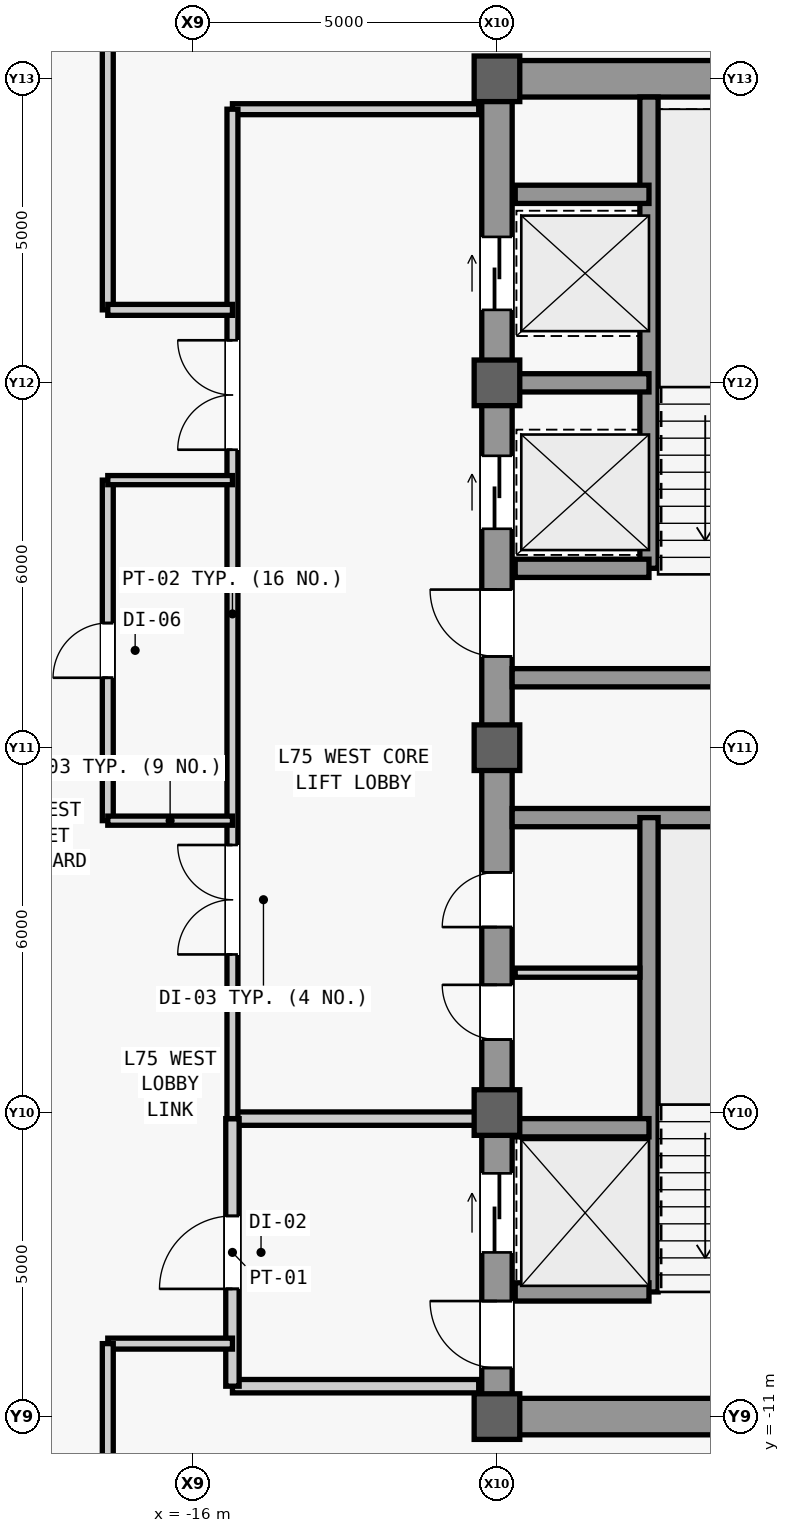
"""IFC4 building model, lengths in metres.
Left out: names, types, materials, properties, quantities, classifications, styles, units other than length and angle.
Written with IfcOpenShell. Run it as: python <this file> out.ifc"""

import sys

from ifc_helpers import new_model, si_unit, direction, frame, frame_2d, origin, origin_2d, place, context, subcontext, project, spatial, rectangle, extrude, source, transform, mapped, element, fill, save


model = new_model("IFC4")
c1 = context("Model", 3, precision=1e-05, world=origin(), true_north=direction((0.0, 1.0)))
c2 = subcontext(c1, "Body", "Model", "MODEL_VIEW")
j1 = project(units=[si_unit("LENGTHUNIT", "METRE"), si_unit("PLANEANGLEUNIT", "RADIAN")], contexts=[c1])
p1 = place(None, origin())
s1 = spatial("IfcSite", under=j1, at=p1, CompositionType="ELEMENT")
p2 = place(p1, origin())
s2 = spatial("IfcBuilding", under=s1, at=p2, CompositionType="ELEMENT")
p3 = place(p2, frame((0.0, 0.0, 317.5)))
s3 = spatial("IfcBuildingStorey", under=s2, at=p3, CompositionType="ELEMENT", Elevation=317.5)
m1 = source(origin(), c2, "Body", "SweptSolid", [
    extrude(rectangle(XDim=22.0, YDim=0.5, at=frame_2d((11.0, 0.0))), origin(), (0.0, 0.0, 1.0), 3.78),
])
p4 = place(p3, frame((-11.0, -11.0, 0.0), z_axis=(0.0, 0.0, 1.0), x_axis=(0.0, 1.0, 0.0)))
e1 = element("IfcWall", 1, at=p4, inside=s3, PredefinedType="SHEAR", context=c2, shape_type="MappedRepresentation", body=[
    mapped(m1, transform((0.0, 0.0, 0.0), scale=1.0)),
])
m2 = source(origin(), c2, "Body", "SweptSolid", [
    extrude(rectangle(XDim=1.1, YDim=2.2, at=frame_2d((0.55, 1.1))), frame((0.0, 0.26, 0.0), z_axis=(0.0, -1.0, 0.0), x_axis=(1.0, 0.0, 0.0)), (0.0, 0.0, 1.0), 0.52),
])
p5 = place(p4, frame((0.8, 0.0, 0.0)))
e2 = element("IfcOpeningElement", 2, at=p5, cuts=e1, PredefinedType="OPENING", context=c2, shape_type="MappedRepresentation", body=[
    mapped(m2, transform((0.0, 0.0, 0.0), scale=1.0)),
])
p6 = place(p4, frame((12.5, 0.0, 0.0)))
e3 = element("IfcOpeningElement", 3, at=p6, cuts=e1, PredefinedType="OPENING", context=c2, shape_type="MappedRepresentation", body=[
    mapped(m2, transform((0.0, 0.0, 0.0), scale=1.0)),
])
m3 = source(origin(), c2, "Body", "SweptSolid", [
    extrude(rectangle(XDim=0.9, YDim=2.15, at=frame_2d((0.45, 1.075))), frame((0.0, 0.26, 0.0), z_axis=(0.0, -1.0, 0.0), x_axis=(1.0, 0.0, 0.0)), (0.0, 0.0, 1.0), 0.52),
])
p7 = place(p4, frame((6.2, 0.0, 0.0)))
e4 = element("IfcOpeningElement", 4, at=p7, cuts=e1, PredefinedType="OPENING", context=c2, shape_type="MappedRepresentation", body=[
    mapped(m3, transform((0.0, 0.0, 0.0), scale=1.0)),
])
p8 = place(p4, frame((8.05, 0.0, 0.0)))
e5 = element("IfcOpeningElement", 5, at=p8, cuts=e1, PredefinedType="OPENING", context=c2, shape_type="MappedRepresentation", body=[
    mapped(m3, transform((0.0, 0.0, 0.0), scale=1.0)),
])
m4 = source(origin(), c2, "Body", "SweptSolid", [
    extrude(rectangle(XDim=1.2, YDim=2.3, at=frame_2d((0.6, 1.15))), frame((0.0, 0.26, 0.0), z_axis=(0.0, -1.0, 0.0), x_axis=(1.0, 0.0, 0.0)), (0.0, 0.0, 1.0), 0.52),
])
p9 = place(p4, frame((14.6, 0.0, 0.0)))
e6 = element("IfcOpeningElement", 6, at=p9, cuts=e1, PredefinedType="OPENING", context=c2, shape_type="MappedRepresentation", body=[
    mapped(m4, transform((0.0, 0.0, 0.0), scale=1.0)),
])
p10 = place(p4, frame((18.2, 0.0, 0.0)))
e7 = element("IfcOpeningElement", 7, at=p10, cuts=e1, PredefinedType="OPENING", context=c2, shape_type="MappedRepresentation", body=[
    mapped(m4, transform((0.0, 0.0, 0.0), scale=1.0)),
])
m5 = source(origin(), c2, "Body", "SweptSolid", [
    extrude(rectangle(XDim=1.3, YDim=2.3, at=frame_2d((0.65, 1.15))), frame((0.0, 0.26, 0.0), z_axis=(0.0, -1.0, 0.0), x_axis=(1.0, 0.0, 0.0)), (0.0, 0.0, 1.0), 0.52),
])
p11 = place(p4, frame((2.7, 0.0, 0.0)))
e8 = element("IfcOpeningElement", 8, at=p11, cuts=e1, PredefinedType="OPENING", context=c2, shape_type="MappedRepresentation", body=[
    mapped(m5, transform((0.0, 0.0, 0.0), scale=1.0)),
])
m6 = source(origin(), c2, "Body", "SweptSolid", [
    extrude(rectangle(XDim=5.9, YDim=0.6, at=frame_2d((2.95, 0.0))), origin(), (0.0, 0.0, 1.0), 3.78),
])
for number, where, z_axis, x_axis in (
    (9, (-10.75, -11.0, 0.0), (0.0, 0.0, 1.0), (1.0, 0.0, 0.0)),
    (10, (-10.75, 11.0, 0.0), (0.0, 0.0, 1.0), (1.0, 0.0, 0.0)),
):
    element("IfcWall", number, at=place(p3, frame(where, z_axis=z_axis, x_axis=x_axis)), inside=s3, PredefinedType="SHEAR", context=c2, shape_type="MappedRepresentation", body=[
        mapped(m6, transform((0.0, 0.0, 0.0), scale=1.0)),
    ])
m7 = source(origin(), c2, "Body", "SweptSolid", [
    extrude(rectangle(XDim=5.65, YDim=0.3, at=frame_2d((2.825, 0.0))), origin(), (0.0, 0.0, 1.0), 3.78),
])
for number, where, z_axis, x_axis in (
    (11, (-10.75, -1.15, 0.0), (0.0, 0.0, 1.0), (1.0, 0.0, 0.0)),
    (12, (-10.75, 1.15, 0.0), (0.0, 0.0, 1.0), (1.0, 0.0, 0.0)),
):
    element("IfcWall", number, at=place(p3, frame(where, z_axis=z_axis, x_axis=x_axis)), inside=s3, PredefinedType="SHEAR", context=c2, shape_type="MappedRepresentation", body=[
        mapped(m7, transform((0.0, 0.0, 0.0), scale=1.0)),
    ])
m8 = source(origin(), c2, "Body", "SweptSolid", [
    extrude(rectangle(XDim=0.75, YDim=0.75, at=origin_2d()), origin(), (0.0, 0.0, 1.0), 4.0),
])
for number, where, z_axis, x_axis in (
    (13, (-11.0, -11.0, 0.0), (0.0, 0.0, 1.0), (1.0, 0.0, 0.0)),
    (14, (-11.0, -6.0, 0.0), (0.0, 0.0, 1.0), (1.0, 0.0, 0.0)),
    (15, (-11.0, 0.0, 0.0), (0.0, 0.0, 1.0), (1.0, 0.0, 0.0)),
    (16, (-11.0, 6.0, 0.0), (0.0, 0.0, 1.0), (1.0, 0.0, 0.0)),
    (17, (-11.0, 11.0, 0.0), (0.0, 0.0, 1.0), (1.0, 0.0, 0.0)),
):
    element("IfcColumn", number, at=place(p3, frame(where, z_axis=z_axis, x_axis=x_axis)), inside=s3, PredefinedType="COLUMN", context=c2, shape_type="MappedRepresentation", body=[
        mapped(m8, transform((0.0, 0.0, 0.0), scale=1.0)),
    ])
m9 = source(origin(), c2, "Body", "SweptSolid", [
    extrude(rectangle(XDim=7.8, YDim=0.3, at=frame_2d((3.9, 0.0))), origin(), (0.0, 0.0, 1.0), 3.78),
])
p12 = place(p3, frame((-8.5, -8.95, 0.0), z_axis=(0.0, 0.0, 1.0), x_axis=(0.0, 1.0, 0.0)))
e18 = element("IfcWall", 18, at=p12, inside=s3, PredefinedType="SHEAR", context=c2, shape_type="MappedRepresentation", body=[
    mapped(m9, transform((0.0, 0.0, 0.0), scale=1.0)),
])
m10 = source(origin(), c2, "Body", "SweptSolid", [
    extrude(rectangle(XDim=2.2, YDim=0.3, at=frame_2d((1.1, 0.0))), origin(), (0.0, 0.0, 1.0), 3.78),
])
for number, where, z_axis, x_axis in (
    (19, (-10.7, -8.95, 0.0), (0.0, 0.0, 1.0), (1.0, 0.0, 0.0)),
    (20, (-10.7, -6.25, 0.0), (0.0, 0.0, 1.0), (1.0, 0.0, 0.0)),
):
    element("IfcWall", number, at=place(p3, frame(where, z_axis=z_axis, x_axis=x_axis)), inside=s3, PredefinedType="SHEAR", context=c2, shape_type="MappedRepresentation", body=[
        mapped(m10, transform((0.0, 0.0, 0.0), scale=1.0)),
    ])
m11 = source(origin(), c2, "Body", "SweptSolid", [
    extrude(rectangle(XDim=7.75, YDim=0.3, at=frame_2d((3.875, 0.0))), origin(), (0.0, 0.0, 1.0), 3.78),
])
p13 = place(p3, frame((-8.5, 2.95, 0.0), z_axis=(0.0, 0.0, 1.0), x_axis=(0.0, 1.0, 0.0)))
e21 = element("IfcWall", 21, at=p13, inside=s3, PredefinedType="SHEAR", context=c2, shape_type="MappedRepresentation", body=[
    mapped(m11, transform((0.0, 0.0, 0.0), scale=1.0)),
])
for number, where, z_axis, x_axis in (
    (22, (-10.7, 2.95, 0.0), (0.0, 0.0, 1.0), (1.0, 0.0, 0.0)),
    (23, (-10.7, 6.0, 0.0), (0.0, 0.0, 1.0), (1.0, 0.0, 0.0)),
    (24, (-10.7, 9.1, 0.0), (0.0, 0.0, 1.0), (1.0, 0.0, 0.0)),
):
    element("IfcWall", number, at=place(p3, frame(where, z_axis=z_axis, x_axis=x_axis)), inside=s3, PredefinedType="SHEAR", context=c2, shape_type="MappedRepresentation", body=[
        mapped(m10, transform((0.0, 0.0, 0.0), scale=1.0)),
    ])
m12 = source(origin(), c2, "Body", "SweptSolid", [
    extrude(rectangle(XDim=2.05, YDim=0.15, at=frame_2d((1.025, 0.0))), origin(), (0.0, 0.0, 1.0), 3.78),
])
p14 = place(p3, frame((-10.7, -3.7, 0.0), z_axis=(0.0, 0.0, 1.0), x_axis=(1.0, 0.0, 0.0)))
e25 = element("IfcWall", 25, at=p14, inside=s3, PredefinedType="PARTITIONING", context=c2, shape_type="MappedRepresentation", body=[
    mapped(m12, transform((0.0, 0.0, 0.0), scale=1.0)),
])
m13 = source(origin(), c2, "Body", "SweptSolid", [
    extrude(rectangle(XDim=4.05, YDim=0.22, at=frame_2d((2.025, 0.0))), origin(), (0.0, 0.0, 1.0), 3.78),
])
p15 = place(p3, frame((-15.35, -10.5, 0.0), z_axis=(0.0, 0.0, 1.0), x_axis=(1.0, 0.0, 0.0)))
e26 = element("IfcWall", 26, at=p15, inside=s3, PredefinedType="PARTITIONING", context=c2, shape_type="MappedRepresentation", body=[
    mapped(m13, transform((0.0, 0.0, 0.0), scale=1.0)),
])
m14 = source(origin(), c2, "Body", "SweptSolid", [
    extrude(rectangle(XDim=4.05, YDim=0.22, at=frame_2d((2.025, 0.0))), origin(), (0.0, 0.0, 1.0), 3.085),
])
p16 = place(p3, frame((-15.35, -6.1, 0.0), z_axis=(0.0, 0.0, 1.0), x_axis=(1.0, 0.0, 0.0)))
e27 = element("IfcWall", 27, at=p16, inside=s3, PredefinedType="PARTITIONING", context=c2, shape_type="MappedRepresentation", body=[
    mapped(m14, transform((0.0, 0.0, 0.0), scale=1.0)),
])
m15 = source(origin(), c2, "Body", "SweptSolid", [
    extrude(rectangle(XDim=4.4, YDim=0.22, at=frame_2d((2.2, 0.0))), origin(), (0.0, 0.0, 1.0), 3.78),
])
p17 = place(p3, frame((-15.35, -10.5, 0.0), z_axis=(0.0, 0.0, 1.0), x_axis=(0.0, 1.0, 0.0)))
e28 = element("IfcWall", 28, at=p17, inside=s3, PredefinedType="PARTITIONING", context=c2, shape_type="MappedRepresentation", body=[
    mapped(m15, transform((0.0, 0.0, 0.0), scale=1.0)),
])
m16 = source(origin(), c2, "Body", "SweptSolid", [
    extrude(rectangle(XDim=1.2, YDim=2.2, at=frame_2d((0.6, 1.1))), frame((0.0, 0.12, 0.0), z_axis=(0.0, -1.0, 0.0), x_axis=(1.0, 0.0, 0.0)), (0.0, 0.0, 1.0), 0.24),
])
p18 = place(p17, frame((1.6, 0.0, 0.0)))
e29 = element("IfcOpeningElement", 29, at=p18, cuts=e28, PredefinedType="OPENING", context=c2, shape_type="MappedRepresentation", body=[
    mapped(m16, transform((0.0, 0.0, 0.0), scale=1.0)),
])
m17 = source(origin(), c2, "Body", "SweptSolid", [
    extrude(rectangle(XDim=4.05, YDim=0.18, at=frame_2d((2.025, 0.0))), origin(), (0.0, 0.0, 1.0), 3.78),
])
p19 = place(p3, frame((-15.35, 10.5, 0.0), z_axis=(0.0, 0.0, 1.0), x_axis=(1.0, 0.0, 0.0)))
e30 = element("IfcWall", 30, at=p19, inside=s3, PredefinedType="PARTITIONING", context=c2, shape_type="MappedRepresentation", body=[
    mapped(m17, transform((0.0, 0.0, 0.0), scale=1.0)),
])
m18 = source(origin(), c2, "Body", "SweptSolid", [
    extrude(rectangle(XDim=16.6, YDim=0.18, at=frame_2d((8.3, 0.0))), origin(), (0.0, 0.0, 1.0), 3.78),
])
p20 = place(p3, frame((-15.35, -6.1, 0.0), z_axis=(0.0, 0.0, 1.0), x_axis=(0.0, 1.0, 0.0)))
e31 = element("IfcWall", 31, at=p20, inside=s3, PredefinedType="PARTITIONING", context=c2, shape_type="MappedRepresentation", body=[
    mapped(m18, transform((0.0, 0.0, 0.0), scale=1.0)),
])
m19 = source(origin(), c2, "Body", "SweptSolid", [
    extrude(rectangle(XDim=1.8, YDim=2.25, at=frame_2d((0.9, 1.125))), frame((0.0, 0.1, 0.0), z_axis=(0.0, -1.0, 0.0), x_axis=(1.0, 0.0, 0.0)), (0.0, 0.0, 1.0), 0.2),
])
p21 = place(p20, frame((2.7, 0.0, 0.0)))
e32 = element("IfcOpeningElement", 32, at=p21, cuts=e31, PredefinedType="OPENING", context=c2, shape_type="MappedRepresentation", body=[
    mapped(m19, transform((0.0, 0.0, 0.0), scale=1.0)),
])
p22 = place(p20, frame((11.0, 0.0, 0.0)))
e33 = element("IfcOpeningElement", 33, at=p22, cuts=e31, PredefinedType="OPENING", context=c2, shape_type="MappedRepresentation", body=[
    mapped(m19, transform((0.0, 0.0, 0.0), scale=1.0)),
])
m20 = source(origin(), c2, "Body", "SweptSolid", [
    extrude(rectangle(XDim=5.6, YDim=0.18, at=frame_2d((2.8, 0.0))), origin(), (0.0, 0.0, 1.0), 3.78),
])
p23 = place(p3, frame((-17.4, -1.2, 0.0), z_axis=(0.0, 0.0, 1.0), x_axis=(0.0, 1.0, 0.0)))
e34 = element("IfcWall", 34, at=p23, inside=s3, PredefinedType="PARTITIONING", context=c2, shape_type="MappedRepresentation", body=[
    mapped(m20, transform((0.0, 0.0, 0.0), scale=1.0)),
])
m21 = source(origin(), c2, "Body", "SweptSolid", [
    extrude(rectangle(XDim=0.9, YDim=2.15, at=frame_2d((0.45, 1.075))), frame((0.0, 0.1, 0.0), z_axis=(0.0, -1.0, 0.0), x_axis=(1.0, 0.0, 0.0)), (0.0, 0.0, 1.0), 0.2),
])
p24 = place(p23, frame((2.35, 0.0, 0.0)))
e35 = element("IfcOpeningElement", 35, at=p24, cuts=e34, PredefinedType="OPENING", context=c2, shape_type="MappedRepresentation", body=[
    mapped(m21, transform((0.0, 0.0, 0.0), scale=1.0)),
])
m22 = source(origin(), c2, "Body", "SweptSolid", [
    extrude(rectangle(XDim=2.05, YDim=0.15, at=frame_2d((1.025, 0.0))), origin(), (0.0, 0.0, 1.0), 3.78),
])
for number, where, z_axis, x_axis in (
    (36, (-17.4, -1.2, 0.0), (0.0, 0.0, 1.0), (1.0, 0.0, 0.0)),
    (37, (-17.4, 4.4, 0.0), (0.0, 0.0, 1.0), (1.0, 0.0, 0.0)),
):
    element("IfcWall", number, at=place(p3, frame(where, z_axis=z_axis, x_axis=x_axis)), inside=s3, PredefinedType="PARTITIONING", context=c2, shape_type="MappedRepresentation", body=[
        mapped(m22, transform((0.0, 0.0, 0.0), scale=1.0)),
    ])
m23 = source(origin(), c2, "Body", "SweptSolid", [
    extrude(rectangle(XDim=2.05, YDim=0.18, at=frame_2d((1.025, 0.0))), origin(), (0.0, 0.0, 1.0), 3.78),
])
p25 = place(p3, frame((-17.4, -9.8, 0.0), z_axis=(0.0, 0.0, 1.0), x_axis=(1.0, 0.0, 0.0)))
e38 = element("IfcWall", 38, at=p25, inside=s3, PredefinedType="PARTITIONING", context=c2, shape_type="MappedRepresentation", body=[
    mapped(m23, transform((0.0, 0.0, 0.0), scale=1.0)),
])
m24 = source(origin(), c2, "Body", "SweptSolid", [
    extrude(rectangle(XDim=8.4, YDim=0.18, at=frame_2d((4.2, 0.0))), origin(), (0.0, 0.0, 1.0), 3.78),
])
p26 = place(p3, frame((-17.4, 7.2, 0.0), z_axis=(0.0, 0.0, 1.0), x_axis=(0.0, 1.0, 0.0)))
e39 = element("IfcWall", 39, at=p26, inside=s3, PredefinedType="PARTITIONING", context=c2, shape_type="MappedRepresentation", body=[
    mapped(m24, transform((0.0, 0.0, 0.0), scale=1.0)),
])
p27 = place(p3, frame((-17.4, 7.2, 0.0), z_axis=(0.0, 0.0, 1.0), x_axis=(1.0, 0.0, 0.0)))
e40 = element("IfcWall", 40, at=p27, inside=s3, PredefinedType="PARTITIONING", context=c2, shape_type="MappedRepresentation", body=[
    mapped(m23, transform((0.0, 0.0, 0.0), scale=1.0)),
])
m25 = source(origin(), c2, "Body", "SweptSolid", [
    extrude(rectangle(XDim=5.8, YDim=0.18, at=frame_2d((2.9, 0.0))), origin(), (0.0, 0.0, 1.0), 3.78),
])
p28 = place(p3, frame((-17.4, -15.6, 0.0), z_axis=(0.0, 0.0, 1.0), x_axis=(0.0, 1.0, 0.0)))
e41 = element("IfcWall", 41, at=p28, inside=s3, PredefinedType="PARTITIONING", context=c2, shape_type="MappedRepresentation", body=[
    mapped(m25, transform((0.0, 0.0, 0.0), scale=1.0)),
])
m26 = source(origin(), c2, "Body", "SweptSolid", [
    extrude(rectangle(XDim=1.1, YDim=2.2, at=frame_2d((0.55, 1.1))), frame((0.0, 0.025, 0.0), z_axis=(0.0, -1.0, 0.0), x_axis=(1.0, 0.0, 0.0)), (0.0, 0.0, 1.0), 0.05),
])
p29 = place(p5, origin())
e42 = element("IfcDoor", 42, at=p29, inside=s3, OperationType="SINGLE_SWING_RIGHT", PredefinedType="DOOR", context=c2, shape_type="MappedRepresentation", body=[
    mapped(m26, transform((0.0, 0.0, 0.0), scale=1.0)),
])
fill(e2, e42)
p30 = place(p6, origin())
e43 = element("IfcDoor", 43, at=p30, inside=s3, OperationType="SINGLE_SWING_RIGHT", PredefinedType="DOOR", context=c2, shape_type="MappedRepresentation", body=[
    mapped(m26, transform((0.0, 0.0, 0.0), scale=1.0)),
])
fill(e3, e43)
m27 = source(origin(), c2, "Body", "SweptSolid", [
    extrude(rectangle(XDim=0.9, YDim=2.15, at=frame_2d((0.45, 1.075))), frame((0.0, 0.025, 0.0), z_axis=(0.0, -1.0, 0.0), x_axis=(1.0, 0.0, 0.0)), (0.0, 0.0, 1.0), 0.05),
])
p31 = place(p7, origin())
e44 = element("IfcDoor", 44, at=p31, inside=s3, OperationType="SINGLE_SWING_RIGHT", PredefinedType="DOOR", context=c2, shape_type="MappedRepresentation", body=[
    mapped(m27, transform((0.0, 0.0, 0.0), scale=1.0)),
])
fill(e4, e44)
p32 = place(p8, origin())
e45 = element("IfcDoor", 45, at=p32, inside=s3, OperationType="SINGLE_SWING_LEFT", PredefinedType="DOOR", context=c2, shape_type="MappedRepresentation", body=[
    mapped(m27, transform((0.0, 0.0, 0.0), scale=1.0)),
])
fill(e5, e45)
m28 = source(origin(), c2, "Body", "SweptSolid", [
    extrude(rectangle(XDim=1.2, YDim=2.2, at=frame_2d((0.6, 1.1))), frame((0.0, 0.025, 0.0), z_axis=(0.0, -1.0, 0.0), x_axis=(1.0, 0.0, 0.0)), (0.0, 0.0, 1.0), 0.05),
])
p33 = place(p18, origin())
e46 = element("IfcDoor", 46, at=p33, inside=s3, OperationType="SINGLE_SWING_LEFT", PredefinedType="DOOR", context=c2, shape_type="MappedRepresentation", body=[
    mapped(m28, transform((0.0, 0.0, 0.0), scale=1.0)),
])
fill(e29, e46)
m29 = source(origin(), c2, "Body", "SweptSolid", [
    extrude(rectangle(XDim=1.8, YDim=2.25, at=frame_2d((0.9, 1.125))), frame((0.0, 0.025, 0.0), z_axis=(0.0, -1.0, 0.0), x_axis=(1.0, 0.0, 0.0)), (0.0, 0.0, 1.0), 0.05),
])
p34 = place(p21, origin())
e47 = element("IfcDoor", 47, at=p34, inside=s3, OperationType="SINGLE_SWING_LEFT", PredefinedType="DOOR", context=c2, shape_type="MappedRepresentation", body=[
    mapped(m29, transform((0.0, 0.0, 0.0), scale=1.0)),
])
fill(e32, e47)
p35 = place(p22, origin())
e48 = element("IfcDoor", 48, at=p35, inside=s3, OperationType="SINGLE_SWING_RIGHT", PredefinedType="DOOR", context=c2, shape_type="MappedRepresentation", body=[
    mapped(m29, transform((0.0, 0.0, 0.0), scale=1.0)),
])
fill(e33, e48)
p36 = place(p24, origin())
e49 = element("IfcDoor", 49, at=p36, inside=s3, OperationType="SINGLE_SWING_LEFT", PredefinedType="DOOR", context=c2, shape_type="MappedRepresentation", body=[
    mapped(m27, transform((0.0, 0.0, 0.0), scale=1.0)),
])
fill(e35, e49)
m30 = source(origin(), c2, "Body", "SweptSolid", [
    extrude(rectangle(XDim=1.2, YDim=2.3, at=frame_2d((0.6, 1.15))), frame((0.0, 0.025, 0.0), z_axis=(0.0, -1.0, 0.0), x_axis=(1.0, 0.0, 0.0)), (0.0, 0.0, 1.0), 0.05),
])
p37 = place(p9, origin())
e50 = element("IfcDoor", 50, at=p37, inside=s3, OperationType="SLIDING_TO_LEFT", PredefinedType="DOOR", context=c2, shape_type="MappedRepresentation", body=[
    mapped(m30, transform((0.0, 0.0, 0.0), scale=1.0)),
])
fill(e6, e50)
p38 = place(p10, origin())
e51 = element("IfcDoor", 51, at=p38, inside=s3, OperationType="SLIDING_TO_LEFT", PredefinedType="DOOR", context=c2, shape_type="MappedRepresentation", body=[
    mapped(m30, transform((0.0, 0.0, 0.0), scale=1.0)),
])
fill(e7, e51)
m31 = source(origin(), c2, "Body", "SweptSolid", [
    extrude(rectangle(XDim=1.3, YDim=2.3, at=frame_2d((0.65, 1.15))), frame((0.0, 0.025, 0.0), z_axis=(0.0, -1.0, 0.0), x_axis=(1.0, 0.0, 0.0)), (0.0, 0.0, 1.0), 0.05),
])
p39 = place(p11, origin())
e52 = element("IfcDoor", 52, at=p39, inside=s3, OperationType="SLIDING_TO_LEFT", PredefinedType="DOOR", context=c2, shape_type="MappedRepresentation", body=[
    mapped(m31, transform((0.0, 0.0, 0.0), scale=1.0)),
])
fill(e8, e52)
save(model, sys.argv[1])
